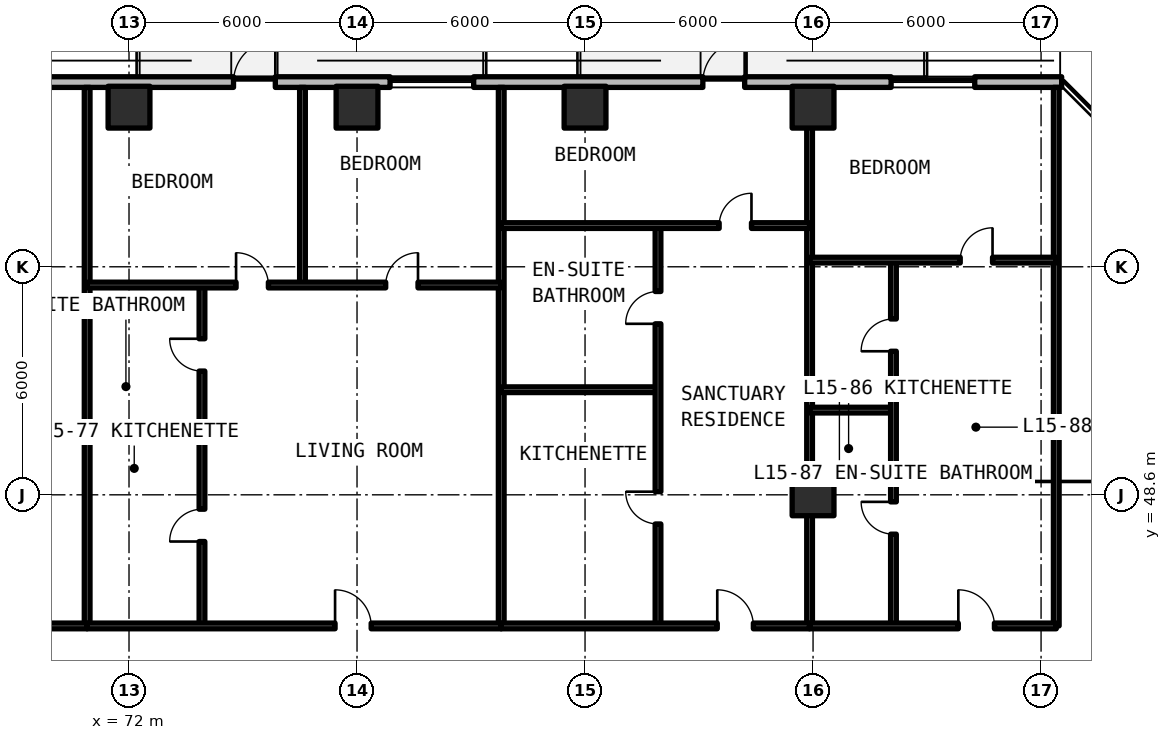
"""IFC4 building model, lengths in metres.
Left out: names, types, materials, properties, quantities, classifications, styles, units other than length and angle.
Written with IfcOpenShell. Run it as: python <this file> out.ifc"""

import sys

from ifc_helpers import new_model, si_unit, direction, frame, frame_2d, origin, origin_2d, place, context, subcontext, project, spatial, rectangle, extrude, element, fill, save


model = new_model("IFC4")
c1 = context("Model", 3, precision=1e-05, world=origin(), true_north=direction((0.0, 1.0)))
c2 = subcontext(c1, "Body", "Model", "MODEL_VIEW")
j1 = project(units=[si_unit("LENGTHUNIT", "METRE"), si_unit("PLANEANGLEUNIT", "RADIAN")], contexts=[c1])
p1 = place(None, origin())
s1 = spatial("IfcSite", under=j1, at=p1, CompositionType="ELEMENT")
p2 = place(p1, origin())
s2 = spatial("IfcBuilding", under=s1, at=p2, CompositionType="ELEMENT")
p3 = place(p2, frame((0.0, 0.0, 55.44)))
s3 = spatial("IfcBuildingStorey", under=s2, at=p3, CompositionType="ELEMENT", Elevation=55.44)
for number, where, z_axis, x_axis in (
    (1, (90.0, 48.6, 0.0), (0.0, 0.0, 1.0), (1.0, 0.0, 0.0)),
    (2, (72.0, 58.8, 0.0), (0.0, 0.0, 1.0), (1.0, 0.0, 0.0)),
    (3, (78.0, 58.8, 0.0), (0.0, 0.0, 1.0), (1.0, 0.0, 0.0)),
    (4, (84.0, 58.8, 0.0), (0.0, 0.0, 1.0), (1.0, 0.0, 0.0)),
    (5, (90.0, 58.8, 0.0), (0.0, 0.0, 1.0), (1.0, 0.0, 0.0)),
):
    element("IfcColumn", number, at=place(p3, frame(where, z_axis=z_axis, x_axis=x_axis)), inside=s3, PredefinedType="COLUMN", context=c2, shape_type="SweptSolid", body=[
        extrude(rectangle(XDim=1.1, YDim=1.1, at=origin_2d()), origin(), (0.0, 0.0, 1.0), 3.3),
    ])
p4 = place(p3, frame((96.542, 59.46, 0.0), z_axis=(0.0, 0.0, 1.0), x_axis=(-1.0, 0.0, 0.0)))
e6 = element("IfcWall", 6, at=p4, inside=s3, PredefinedType="SOLIDWALL", context=c2, shape_type="SweptSolid", body=[
    extrude(rectangle(XDim=44.402, YDim=0.28, at=frame_2d((22.201, 0.0))), origin(), (0.0, 0.0, 1.0), 3.08),
])
p5 = place(p4, frame((32.292, 0.0, 0.0)))
e7 = element("IfcOpeningElement", 7, at=p5, cuts=e6, PredefinedType="OPENING", context=c2, shape_type="SweptSolid", body=[
    extrude(rectangle(XDim=1.1, YDim=2.15, at=frame_2d((0.55, 1.075))), frame((0.0, 0.15, 0.0), z_axis=(0.0, -1.0, 0.0), x_axis=(1.0, 0.0, 0.0)), (0.0, 0.0, 1.0), 0.3),
])
p6 = place(p4, frame((20.692, 0.0, 0.0)))
e8 = element("IfcOpeningElement", 8, at=p6, cuts=e6, PredefinedType="OPENING", context=c2, shape_type="SweptSolid", body=[
    extrude(rectangle(XDim=1.1, YDim=2.15, at=frame_2d((0.55, 1.075))), frame((0.0, 0.15, 0.0), z_axis=(0.0, -1.0, 0.0), x_axis=(1.0, 0.0, 0.0)), (0.0, 0.0, 1.0), 0.3),
])
p7 = place(p4, frame((8.342, 0.0, 0.0)))
e9 = element("IfcOpeningElement", 9, at=p7, cuts=e6, PredefinedType="OPENING", context=c2, shape_type="SweptSolid", body=[
    extrude(rectangle(XDim=1.1, YDim=2.15, at=frame_2d((0.55, 1.075))), frame((0.0, 0.15, 0.0), z_axis=(0.0, -1.0, 0.0), x_axis=(1.0, 0.0, 0.0)), (0.0, 0.0, 1.0), 0.3),
])
p8 = place(p4, frame((39.502, 0.0, 0.78)))
e10 = element("IfcOpeningElement", 10, at=p8, cuts=e6, PredefinedType="OPENING", context=c2, shape_type="SweptSolid", body=[
    extrude(rectangle(XDim=2.2, YDim=1.66, at=frame_2d((1.1, 0.83))), frame((0.0, 0.15, 0.0), z_axis=(0.0, -1.0, 0.0), x_axis=(1.0, 0.0, 0.0)), (0.0, 0.0, 1.0), 0.3),
])
p9 = place(p4, frame((34.821, 0.0, 0.78)))
e11 = element("IfcOpeningElement", 11, at=p9, cuts=e6, PredefinedType="OPENING", context=c2, shape_type="SweptSolid", body=[
    extrude(rectangle(XDim=0.85, YDim=1.65, at=frame_2d((0.425, 0.825))), frame((0.0, 0.15, 0.0), z_axis=(0.0, -1.0, 0.0), x_axis=(1.0, 0.0, 0.0)), (0.0, 0.0, 1.0), 0.3),
])
p10 = place(p4, frame((15.472, 0.0, 0.78)))
e12 = element("IfcOpeningElement", 12, at=p10, cuts=e6, PredefinedType="OPENING", context=c2, shape_type="SweptSolid", body=[
    extrude(rectangle(XDim=2.2, YDim=1.66, at=frame_2d((1.1, 0.83))), frame((0.0, 0.15, 0.0), z_axis=(0.0, -1.0, 0.0), x_axis=(1.0, 0.0, 0.0)), (0.0, 0.0, 1.0), 0.3),
])
p11 = place(p4, frame((2.288, 0.0, 0.78)))
e13 = element("IfcOpeningElement", 13, at=p11, cuts=e6, PredefinedType="OPENING", context=c2, shape_type="SweptSolid", body=[
    extrude(rectangle(XDim=2.2, YDim=1.66, at=frame_2d((1.1, 0.83))), frame((0.0, 0.15, 0.0), z_axis=(0.0, -1.0, 0.0), x_axis=(1.0, 0.0, 0.0)), (0.0, 0.0, 1.0), 0.3),
])
for number, where, z_axis, x_axis in (
    (14, (96.4, 45.15, 0.0), (0.0, 0.0, 1.0), (0.0, 1.0, 0.0)),
    (15, (70.898, 45.15, 0.0), (0.0, 0.0, 1.0), (0.0, 1.0, 0.0)),
):
    element("IfcWall", number, at=place(p3, frame(where, z_axis=z_axis, x_axis=x_axis)), inside=s3, PredefinedType="SOLIDWALL", context=c2, shape_type="SweptSolid", body=[
        extrude(rectangle(XDim=14.17, YDim=0.15, at=frame_2d((7.085, 0.0))), origin(), (0.0, 0.0, 1.0), 2.35),
    ])
p12 = place(p3, frame((62.552, 45.15, 0.0), z_axis=(0.0, 0.0, 1.0), x_axis=(1.0, 0.0, 0.0)))
e16 = element("IfcWall", 16, at=p12, inside=s3, PredefinedType="SOLIDWALL", context=c2, shape_type="SweptSolid", body=[
    extrude(rectangle(XDim=8.346, YDim=0.15, at=frame_2d((4.173, 0.0))), origin(), (0.0, 0.0, 1.0), 2.35),
])
p13 = place(p12, frame((3.623, 0.0, 0.0)))
e17 = element("IfcOpeningElement", 17, at=p13, cuts=e16, PredefinedType="OPENING", context=c2, shape_type="SweptSolid", body=[
    extrude(rectangle(XDim=1.1, YDim=2.15, at=frame_2d((0.55, 1.075))), frame((0.0, 0.085, 0.0), z_axis=(0.0, -1.0, 0.0), x_axis=(1.0, 0.0, 0.0)), (0.0, 0.0, 1.0), 0.17),
])
p14 = place(p3, frame((81.795, 45.15, 0.0), z_axis=(0.0, 0.0, 1.0), x_axis=(0.0, 1.0, 0.0)))
e18 = element("IfcWall", 18, at=p14, inside=s3, PredefinedType="SOLIDWALL", context=c2, shape_type="SweptSolid", body=[
    extrude(rectangle(XDim=14.17, YDim=0.15, at=frame_2d((7.085, 0.0))), origin(), (0.0, 0.0, 1.0), 2.35),
])
p15 = place(p3, frame((70.898, 50.442, 0.0), z_axis=(0.0, 0.0, 1.0), x_axis=(1.0, 0.0, 0.0)))
e19 = element("IfcWall", 19, at=p15, inside=s3, PredefinedType="PARTITIONING", context=c2, shape_type="SweptSolid", body=[
    extrude(rectangle(XDim=3.021, YDim=0.15, at=frame_2d((1.511, 0.0))), origin(), (0.0, 0.0, 1.0), 2.35),
])
p16 = place(p3, frame((73.92, 45.15, 0.0), z_axis=(0.0, 0.0, 1.0), x_axis=(0.0, 1.0, 0.0)))
e20 = element("IfcWall", 20, at=p16, inside=s3, PredefinedType="PARTITIONING", context=c2, shape_type="SweptSolid", body=[
    extrude(rectangle(XDim=8.97, YDim=0.15, at=frame_2d((4.485, 0.0))), origin(), (0.0, 0.0, 1.0), 2.35),
])
p17 = place(p16, frame((2.221, 0.0, 0.0)))
e21 = element("IfcOpeningElement", 21, at=p17, cuts=e20, PredefinedType="OPENING", context=c2, shape_type="SweptSolid", body=[
    extrude(rectangle(XDim=0.85, YDim=2.1, at=frame_2d((0.425, 1.05))), frame((0.0, 0.085, 0.0), z_axis=(0.0, -1.0, 0.0), x_axis=(1.0, 0.0, 0.0)), (0.0, 0.0, 1.0), 0.17),
])
p18 = place(p16, frame((6.706, 0.0, 0.0)))
e22 = element("IfcOpeningElement", 22, at=p18, cuts=e20, PredefinedType="OPENING", context=c2, shape_type="SweptSolid", body=[
    extrude(rectangle(XDim=0.85, YDim=2.1, at=frame_2d((0.425, 1.05))), frame((0.0, 0.085, 0.0), z_axis=(0.0, -1.0, 0.0), x_axis=(1.0, 0.0, 0.0)), (0.0, 0.0, 1.0), 0.17),
])
p19 = place(p3, frame((76.564, 54.12, 0.0), z_axis=(0.0, 0.0, 1.0), x_axis=(0.0, 1.0, 0.0)))
e23 = element("IfcWall", 23, at=p19, inside=s3, PredefinedType="PARTITIONING", context=c2, shape_type="SweptSolid", body=[
    extrude(rectangle(XDim=5.2, YDim=0.15, at=frame_2d((2.6, 0.0))), origin(), (0.0, 0.0, 1.0), 2.35),
])
p20 = place(p3, frame((70.898, 54.12, 0.0), z_axis=(0.0, 0.0, 1.0), x_axis=(1.0, 0.0, 0.0)))
e24 = element("IfcWall", 24, at=p20, inside=s3, PredefinedType="PARTITIONING", context=c2, shape_type="SweptSolid", body=[
    extrude(rectangle(XDim=10.896, YDim=0.15, at=frame_2d((5.448, 0.0))), origin(), (0.0, 0.0, 1.0), 2.35),
])
p21 = place(p20, frame((3.919, 0.0, 0.0)))
e25 = element("IfcOpeningElement", 25, at=p21, cuts=e24, PredefinedType="OPENING", context=c2, shape_type="SweptSolid", body=[
    extrude(rectangle(XDim=0.85, YDim=2.1, at=frame_2d((0.425, 1.05))), frame((0.0, 0.085, 0.0), z_axis=(0.0, -1.0, 0.0), x_axis=(1.0, 0.0, 0.0)), (0.0, 0.0, 1.0), 0.17),
])
p22 = place(p20, frame((7.856, 0.0, 0.0)))
e26 = element("IfcOpeningElement", 26, at=p22, cuts=e24, PredefinedType="OPENING", context=c2, shape_type="SweptSolid", body=[
    extrude(rectangle(XDim=0.85, YDim=2.1, at=frame_2d((0.425, 1.05))), frame((0.0, 0.085, 0.0), z_axis=(0.0, -1.0, 0.0), x_axis=(1.0, 0.0, 0.0)), (0.0, 0.0, 1.0), 0.17),
])
p23 = place(p3, frame((70.898, 45.15, 0.0), z_axis=(0.0, 0.0, 1.0), x_axis=(1.0, 0.0, 0.0)))
e27 = element("IfcWall", 27, at=p23, inside=s3, PredefinedType="SOLIDWALL", context=c2, shape_type="SweptSolid", body=[
    extrude(rectangle(XDim=10.896, YDim=0.15, at=frame_2d((5.448, 0.0))), origin(), (0.0, 0.0, 1.0), 2.35),
])
p24 = place(p23, frame((6.524, 0.0, 0.0)))
e28 = element("IfcOpeningElement", 28, at=p24, cuts=e27, PredefinedType="OPENING", context=c2, shape_type="SweptSolid", body=[
    extrude(rectangle(XDim=0.95, YDim=2.15, at=frame_2d((0.475, 1.075))), frame((0.0, 0.085, 0.0), z_axis=(0.0, -1.0, 0.0), x_axis=(1.0, 0.0, 0.0)), (0.0, 0.0, 1.0), 0.17),
])
p25 = place(p3, frame((89.909, 45.15, 0.0), z_axis=(0.0, 0.0, 1.0), x_axis=(0.0, 1.0, 0.0)))
e29 = element("IfcWall", 29, at=p25, inside=s3, PredefinedType="SOLIDWALL", context=c2, shape_type="SweptSolid", body=[
    extrude(rectangle(XDim=14.17, YDim=0.15, at=frame_2d((7.085, 0.0))), origin(), (0.0, 0.0, 1.0), 2.35),
])
p26 = place(p3, frame((81.795, 51.365, 0.0), z_axis=(0.0, 0.0, 1.0), x_axis=(1.0, 0.0, 0.0)))
e30 = element("IfcWall", 30, at=p26, inside=s3, PredefinedType="PARTITIONING", context=c2, shape_type="SweptSolid", body=[
    extrude(rectangle(XDim=4.125, YDim=0.15, at=frame_2d((2.062, 0.0))), origin(), (0.0, 0.0, 1.0), 2.35),
])
p27 = place(p3, frame((85.92, 45.15, 0.0), z_axis=(0.0, 0.0, 1.0), x_axis=(0.0, 1.0, 0.0)))
e31 = element("IfcWall", 31, at=p27, inside=s3, PredefinedType="PARTITIONING", context=c2, shape_type="SweptSolid", body=[
    extrude(rectangle(XDim=10.534, YDim=0.15, at=frame_2d((5.267, 0.0))), origin(), (0.0, 0.0, 1.0), 2.35),
])
p28 = place(p27, frame((2.683, 0.0, 0.0)))
e32 = element("IfcOpeningElement", 32, at=p28, cuts=e31, PredefinedType="OPENING", context=c2, shape_type="SweptSolid", body=[
    extrude(rectangle(XDim=0.85, YDim=2.1, at=frame_2d((0.425, 1.05))), frame((0.0, 0.085, 0.0), z_axis=(0.0, -1.0, 0.0), x_axis=(1.0, 0.0, 0.0)), (0.0, 0.0, 1.0), 0.17),
])
p29 = place(p27, frame((7.95, 0.0, 0.0)))
e33 = element("IfcOpeningElement", 33, at=p29, cuts=e31, PredefinedType="OPENING", context=c2, shape_type="SweptSolid", body=[
    extrude(rectangle(XDim=0.85, YDim=2.1, at=frame_2d((0.425, 1.05))), frame((0.0, 0.085, 0.0), z_axis=(0.0, -1.0, 0.0), x_axis=(1.0, 0.0, 0.0)), (0.0, 0.0, 1.0), 0.17),
])
p30 = place(p3, frame((81.795, 55.684, 0.0), z_axis=(0.0, 0.0, 1.0), x_axis=(1.0, 0.0, 0.0)))
e34 = element("IfcWall", 34, at=p30, inside=s3, PredefinedType="PARTITIONING", context=c2, shape_type="SweptSolid", body=[
    extrude(rectangle(XDim=8.114, YDim=0.15, at=frame_2d((4.057, 0.0))), origin(), (0.0, 0.0, 1.0), 2.35),
])
p31 = place(p30, frame((5.735, 0.0, 0.0)))
e35 = element("IfcOpeningElement", 35, at=p31, cuts=e34, PredefinedType="OPENING", context=c2, shape_type="SweptSolid", body=[
    extrude(rectangle(XDim=0.85, YDim=2.1, at=frame_2d((0.425, 1.05))), frame((0.0, 0.085, 0.0), z_axis=(0.0, -1.0, 0.0), x_axis=(1.0, 0.0, 0.0)), (0.0, 0.0, 1.0), 0.17),
])
p32 = place(p3, frame((81.795, 45.15, 0.0), z_axis=(0.0, 0.0, 1.0), x_axis=(1.0, 0.0, 0.0)))
e36 = element("IfcWall", 36, at=p32, inside=s3, PredefinedType="SOLIDWALL", context=c2, shape_type="SweptSolid", body=[
    extrude(rectangle(XDim=8.114, YDim=0.15, at=frame_2d((4.057, 0.0))), origin(), (0.0, 0.0, 1.0), 2.35),
])
p33 = place(p32, frame((5.685, 0.0, 0.0)))
e37 = element("IfcOpeningElement", 37, at=p33, cuts=e36, PredefinedType="OPENING", context=c2, shape_type="SweptSolid", body=[
    extrude(rectangle(XDim=0.95, YDim=2.15, at=frame_2d((0.475, 1.075))), frame((0.0, 0.085, 0.0), z_axis=(0.0, -1.0, 0.0), x_axis=(1.0, 0.0, 0.0)), (0.0, 0.0, 1.0), 0.17),
])
p34 = place(p3, frame((89.909, 50.829, 0.0), z_axis=(0.0, 0.0, 1.0), x_axis=(1.0, 0.0, 0.0)))
e38 = element("IfcWall", 38, at=p34, inside=s3, PredefinedType="PARTITIONING", context=c2, shape_type="SweptSolid", body=[
    extrude(rectangle(XDim=2.207, YDim=0.15, at=frame_2d((1.104, 0.0))), origin(), (0.0, 0.0, 1.0), 2.35),
])
p35 = place(p3, frame((92.116, 45.15, 0.0), z_axis=(0.0, 0.0, 1.0), x_axis=(0.0, 1.0, 0.0)))
e39 = element("IfcWall", 39, at=p35, inside=s3, PredefinedType="PARTITIONING", context=c2, shape_type="SweptSolid", body=[
    extrude(rectangle(XDim=9.625, YDim=0.15, at=frame_2d((4.813, 0.0))), origin(), (0.0, 0.0, 1.0), 2.35),
])
p36 = place(p35, frame((2.415, 0.0, 0.0)))
e40 = element("IfcOpeningElement", 40, at=p36, cuts=e39, PredefinedType="OPENING", context=c2, shape_type="SweptSolid", body=[
    extrude(rectangle(XDim=0.85, YDim=2.1, at=frame_2d((0.425, 1.05))), frame((0.0, 0.085, 0.0), z_axis=(0.0, -1.0, 0.0), x_axis=(1.0, 0.0, 0.0)), (0.0, 0.0, 1.0), 0.17),
])
p37 = place(p35, frame((7.227, 0.0, 0.0)))
e41 = element("IfcOpeningElement", 41, at=p37, cuts=e39, PredefinedType="OPENING", context=c2, shape_type="SweptSolid", body=[
    extrude(rectangle(XDim=0.85, YDim=2.1, at=frame_2d((0.425, 1.05))), frame((0.0, 0.085, 0.0), z_axis=(0.0, -1.0, 0.0), x_axis=(1.0, 0.0, 0.0)), (0.0, 0.0, 1.0), 0.17),
])
p38 = place(p3, frame((89.909, 54.775, 0.0), z_axis=(0.0, 0.0, 1.0), x_axis=(1.0, 0.0, 0.0)))
e42 = element("IfcWall", 42, at=p38, inside=s3, PredefinedType="PARTITIONING", context=c2, shape_type="SweptSolid", body=[
    extrude(rectangle(XDim=6.491, YDim=0.15, at=frame_2d((3.246, 0.0))), origin(), (0.0, 0.0, 1.0), 2.35),
])
p39 = place(p38, frame((3.964, 0.0, 0.0)))
e43 = element("IfcOpeningElement", 43, at=p39, cuts=e42, PredefinedType="OPENING", context=c2, shape_type="SweptSolid", body=[
    extrude(rectangle(XDim=0.85, YDim=2.1, at=frame_2d((0.425, 1.05))), frame((0.0, 0.085, 0.0), z_axis=(0.0, -1.0, 0.0), x_axis=(1.0, 0.0, 0.0)), (0.0, 0.0, 1.0), 0.17),
])
p40 = place(p3, frame((89.909, 45.15, 0.0), z_axis=(0.0, 0.0, 1.0), x_axis=(1.0, 0.0, 0.0)))
e44 = element("IfcWall", 44, at=p40, inside=s3, PredefinedType="SOLIDWALL", context=c2, shape_type="SweptSolid", body=[
    extrude(rectangle(XDim=6.491, YDim=0.15, at=frame_2d((3.246, 0.0))), origin(), (0.0, 0.0, 1.0), 2.35),
])
p41 = place(p40, frame((3.914, 0.0, 0.0)))
e45 = element("IfcOpeningElement", 45, at=p41, cuts=e44, PredefinedType="OPENING", context=c2, shape_type="SweptSolid", body=[
    extrude(rectangle(XDim=0.95, YDim=2.15, at=frame_2d((0.475, 1.075))), frame((0.0, 0.085, 0.0), z_axis=(0.0, -1.0, 0.0), x_axis=(1.0, 0.0, 0.0)), (0.0, 0.0, 1.0), 0.17),
])
p42 = place(p6, frame((1.1, 0.0, 0.0), z_axis=(0.0, 0.0, 1.0), x_axis=(-1.0, 0.0, 0.0)))
e46 = element("IfcDoor", 46, at=p42, inside=s3, OperationType="SINGLE_SWING_LEFT", PredefinedType="DOOR", context=c2, shape_type="SweptSolid", body=[
    extrude(rectangle(XDim=1.1, YDim=2.15, at=frame_2d((0.55, 1.075))), frame((0.0, 0.025, 0.0), z_axis=(0.0, -1.0, 0.0), x_axis=(1.0, 0.0, 0.0)), (0.0, 0.0, 1.0), 0.05),
])
fill(e8, e46)
p43 = place(p7, frame((1.1, 0.0, 0.0), z_axis=(0.0, 0.0, 1.0), x_axis=(-1.0, 0.0, 0.0)))
e47 = element("IfcDoor", 47, at=p43, inside=s3, OperationType="SINGLE_SWING_RIGHT", PredefinedType="DOOR", context=c2, shape_type="SweptSolid", body=[
    extrude(rectangle(XDim=1.1, YDim=2.15, at=frame_2d((0.55, 1.075))), frame((0.0, 0.025, 0.0), z_axis=(0.0, -1.0, 0.0), x_axis=(1.0, 0.0, 0.0)), (0.0, 0.0, 1.0), 0.05),
])
fill(e9, e47)
p44 = place(p10, origin())
e48 = element("IfcWindow", 48, at=p44, inside=s3, PartitioningType="SINGLE_PANEL", PredefinedType="WINDOW", context=c2, shape_type="SweptSolid", body=[
    extrude(rectangle(XDim=2.2, YDim=1.66, at=frame_2d((1.1, 0.83))), frame((0.0, 0.03, 0.0), z_axis=(0.0, -1.0, 0.0), x_axis=(1.0, 0.0, 0.0)), (0.0, 0.0, 1.0), 0.06),
])
fill(e12, e48)
p45 = place(p11, origin())
e49 = element("IfcWindow", 49, at=p45, inside=s3, PartitioningType="SINGLE_PANEL", PredefinedType="WINDOW", context=c2, shape_type="SweptSolid", body=[
    extrude(rectangle(XDim=2.2, YDim=1.66, at=frame_2d((1.1, 0.83))), frame((0.0, 0.03, 0.0), z_axis=(0.0, -1.0, 0.0), x_axis=(1.0, 0.0, 0.0)), (0.0, 0.0, 1.0), 0.06),
])
fill(e13, e49)
p46 = place(p17, origin())
e50 = element("IfcDoor", 50, at=p46, inside=s3, OperationType="SINGLE_SWING_LEFT", PredefinedType="DOOR", context=c2, shape_type="SweptSolid", body=[
    extrude(rectangle(XDim=0.85, YDim=2.1, at=frame_2d((0.425, 1.05))), frame((0.0, 0.025, 0.0), z_axis=(0.0, -1.0, 0.0), x_axis=(1.0, 0.0, 0.0)), (0.0, 0.0, 1.0), 0.05),
])
fill(e21, e50)
p47 = place(p18, origin())
e51 = element("IfcDoor", 51, at=p47, inside=s3, OperationType="SINGLE_SWING_RIGHT", PredefinedType="DOOR", context=c2, shape_type="SweptSolid", body=[
    extrude(rectangle(XDim=0.85, YDim=2.1, at=frame_2d((0.425, 1.05))), frame((0.0, 0.025, 0.0), z_axis=(0.0, -1.0, 0.0), x_axis=(1.0, 0.0, 0.0)), (0.0, 0.0, 1.0), 0.05),
])
fill(e22, e51)
p48 = place(p21, origin())
e52 = element("IfcDoor", 52, at=p48, inside=s3, OperationType="SINGLE_SWING_LEFT", PredefinedType="DOOR", context=c2, shape_type="SweptSolid", body=[
    extrude(rectangle(XDim=0.85, YDim=2.1, at=frame_2d((0.425, 1.05))), frame((0.0, 0.025, 0.0), z_axis=(0.0, -1.0, 0.0), x_axis=(1.0, 0.0, 0.0)), (0.0, 0.0, 1.0), 0.05),
])
fill(e25, e52)
p49 = place(p22, origin())
e53 = element("IfcDoor", 53, at=p49, inside=s3, OperationType="SINGLE_SWING_RIGHT", PredefinedType="DOOR", context=c2, shape_type="SweptSolid", body=[
    extrude(rectangle(XDim=0.85, YDim=2.1, at=frame_2d((0.425, 1.05))), frame((0.0, 0.025, 0.0), z_axis=(0.0, -1.0, 0.0), x_axis=(1.0, 0.0, 0.0)), (0.0, 0.0, 1.0), 0.05),
])
fill(e26, e53)
p50 = place(p24, origin())
e54 = element("IfcDoor", 54, at=p50, inside=s3, OperationType="SINGLE_SWING_LEFT", PredefinedType="DOOR", context=c2, shape_type="SweptSolid", body=[
    extrude(rectangle(XDim=0.95, YDim=2.15, at=frame_2d((0.475, 1.075))), frame((0.0, 0.025, 0.0), z_axis=(0.0, -1.0, 0.0), x_axis=(1.0, 0.0, 0.0)), (0.0, 0.0, 1.0), 0.05),
])
fill(e28, e54)
p51 = place(p28, origin())
e55 = element("IfcDoor", 55, at=p51, inside=s3, OperationType="SINGLE_SWING_RIGHT", PredefinedType="DOOR", context=c2, shape_type="SweptSolid", body=[
    extrude(rectangle(XDim=0.85, YDim=2.1, at=frame_2d((0.425, 1.05))), frame((0.0, 0.025, 0.0), z_axis=(0.0, -1.0, 0.0), x_axis=(1.0, 0.0, 0.0)), (0.0, 0.0, 1.0), 0.05),
])
fill(e32, e55)
p52 = place(p29, origin())
e56 = element("IfcDoor", 56, at=p52, inside=s3, OperationType="SINGLE_SWING_LEFT", PredefinedType="DOOR", context=c2, shape_type="SweptSolid", body=[
    extrude(rectangle(XDim=0.85, YDim=2.1, at=frame_2d((0.425, 1.05))), frame((0.0, 0.025, 0.0), z_axis=(0.0, -1.0, 0.0), x_axis=(1.0, 0.0, 0.0)), (0.0, 0.0, 1.0), 0.05),
])
fill(e33, e56)
p53 = place(p31, origin())
e57 = element("IfcDoor", 57, at=p53, inside=s3, OperationType="SINGLE_SWING_RIGHT", PredefinedType="DOOR", context=c2, shape_type="SweptSolid", body=[
    extrude(rectangle(XDim=0.85, YDim=2.1, at=frame_2d((0.425, 1.05))), frame((0.0, 0.025, 0.0), z_axis=(0.0, -1.0, 0.0), x_axis=(1.0, 0.0, 0.0)), (0.0, 0.0, 1.0), 0.05),
])
fill(e35, e57)
p54 = place(p33, origin())
e58 = element("IfcDoor", 58, at=p54, inside=s3, OperationType="SINGLE_SWING_LEFT", PredefinedType="DOOR", context=c2, shape_type="SweptSolid", body=[
    extrude(rectangle(XDim=0.95, YDim=2.15, at=frame_2d((0.475, 1.075))), frame((0.0, 0.025, 0.0), z_axis=(0.0, -1.0, 0.0), x_axis=(1.0, 0.0, 0.0)), (0.0, 0.0, 1.0), 0.05),
])
fill(e37, e58)
p55 = place(p36, origin())
e59 = element("IfcDoor", 59, at=p55, inside=s3, OperationType="SINGLE_SWING_RIGHT", PredefinedType="DOOR", context=c2, shape_type="SweptSolid", body=[
    extrude(rectangle(XDim=0.85, YDim=2.1, at=frame_2d((0.425, 1.05))), frame((0.0, 0.025, 0.0), z_axis=(0.0, -1.0, 0.0), x_axis=(1.0, 0.0, 0.0)), (0.0, 0.0, 1.0), 0.05),
])
fill(e40, e59)
p56 = place(p37, origin())
e60 = element("IfcDoor", 60, at=p56, inside=s3, OperationType="SINGLE_SWING_LEFT", PredefinedType="DOOR", context=c2, shape_type="SweptSolid", body=[
    extrude(rectangle(XDim=0.85, YDim=2.1, at=frame_2d((0.425, 1.05))), frame((0.0, 0.025, 0.0), z_axis=(0.0, -1.0, 0.0), x_axis=(1.0, 0.0, 0.0)), (0.0, 0.0, 1.0), 0.05),
])
fill(e41, e60)
p57 = place(p39, origin())
e61 = element("IfcDoor", 61, at=p57, inside=s3, OperationType="SINGLE_SWING_RIGHT", PredefinedType="DOOR", context=c2, shape_type="SweptSolid", body=[
    extrude(rectangle(XDim=0.85, YDim=2.1, at=frame_2d((0.425, 1.05))), frame((0.0, 0.025, 0.0), z_axis=(0.0, -1.0, 0.0), x_axis=(1.0, 0.0, 0.0)), (0.0, 0.0, 1.0), 0.05),
])
fill(e43, e61)
p58 = place(p41, origin())
e62 = element("IfcDoor", 62, at=p58, inside=s3, OperationType="SINGLE_SWING_LEFT", PredefinedType="DOOR", context=c2, shape_type="SweptSolid", body=[
    extrude(rectangle(XDim=0.95, YDim=2.15, at=frame_2d((0.475, 1.075))), frame((0.0, 0.025, 0.0), z_axis=(0.0, -1.0, 0.0), x_axis=(1.0, 0.0, 0.0)), (0.0, 0.0, 1.0), 0.05),
])
fill(e45, e62)
save(model, sys.argv[1])
